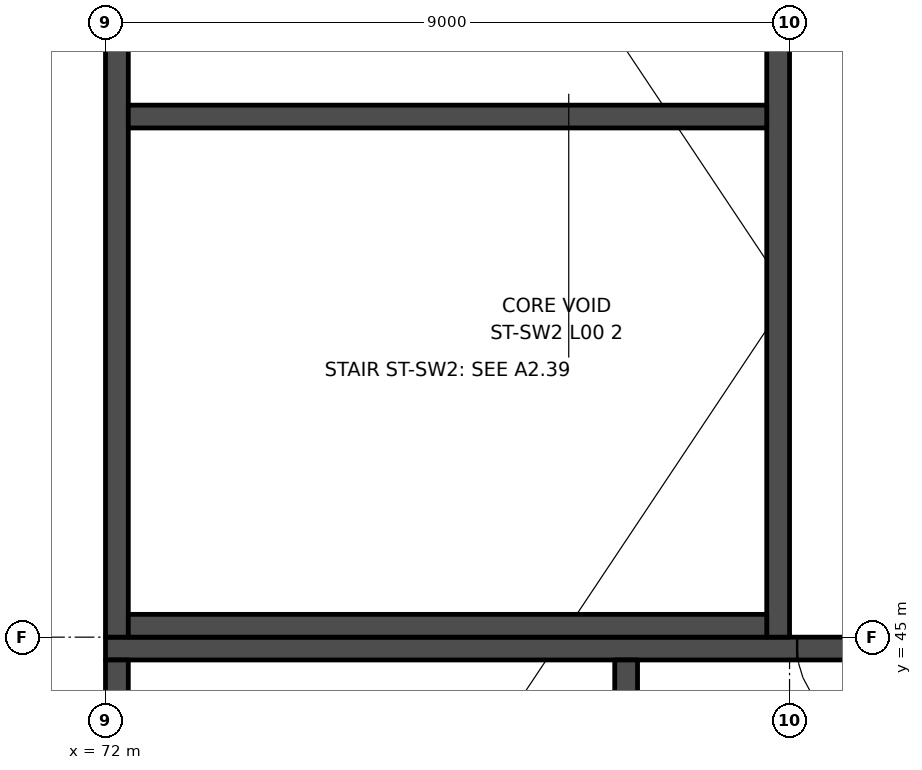
"""IFC4 building model, lengths in metres.
Left out: names, types, materials, properties, quantities, classifications, styles, units other than length and angle.
Written with IfcOpenShell. Run it as: python <this file> out.ifc"""

import sys

from ifc_helpers import new_model, si_unit, direction, frame, frame_2d, origin, place, context, subcontext, project, spatial, rectangle, extrude, element, fill, save


model = new_model("IFC4")
c1 = context("Model", 3, precision=1e-05, world=origin(), true_north=direction((0.0, 1.0)))
c2 = subcontext(c1, "Body", "Model", "MODEL_VIEW")
j1 = project(units=[si_unit("LENGTHUNIT", "METRE"), si_unit("PLANEANGLEUNIT", "RADIAN")], contexts=[c1])
p1 = place(None, origin())
s1 = spatial("IfcSite", under=j1, at=p1, CompositionType="ELEMENT")
p2 = place(p1, origin())
s2 = spatial("IfcBuilding", under=s1, at=p2, CompositionType="ELEMENT")
p3 = place(p2, origin())
s3 = spatial("IfcBuildingStorey", under=s2, at=p3, CompositionType="ELEMENT", Elevation=0.0)
p4 = place(p3, frame((90.25, 44.85, 0.0), z_axis=(0.0, 0.0, 1.0), x_axis=(-1.0, 0.0, 0.0)))
e1 = element("IfcWall", 1, at=p4, inside=s3, PredefinedType="SHEAR", context=c2, shape_type="SweptSolid", body=[
    extrude(rectangle(XDim=18.25, YDim=0.3, at=frame_2d((9.125, 0.0))), origin(), (0.0, 0.0, 1.0), 7.0),
])
p5 = place(p4, frame((8.15, 0.0, 0.0)))
e2 = element("IfcOpeningElement", 2, at=p5, cuts=e1, PredefinedType="OPENING", context=c2, shape_type="SweptSolid", body=[
    extrude(rectangle(XDim=1.0, YDim=2.1, at=frame_2d((0.5, 1.05))), frame((0.0, 0.16, 0.0), z_axis=(0.0, -1.0, 0.0), x_axis=(1.0, 0.0, 0.0)), (0.0, 0.0, 1.0), 0.32),
])
for number, where, z_axis, x_axis in (
    (3, (72.15, 44.7, 0.0), (0.0, 0.0, 1.0), (0.0, -1.0, 0.0)),
    (4, (78.85, 44.7, 0.0), (0.0, 0.0, 1.0), (0.0, -1.0, 0.0)),
):
    element("IfcWall", number, at=place(p3, frame(where, z_axis=z_axis, x_axis=x_axis)), inside=s3, PredefinedType="SHEAR", context=c2, shape_type="SweptSolid", body=[
        extrude(rectangle(XDim=8.4, YDim=0.3, at=frame_2d((4.2, 0.0))), origin(), (0.0, 0.0, 1.0), 7.0),
    ])
p6 = place(p3, frame((80.85, 63.0, 0.0), z_axis=(0.0, 0.0, 1.0), x_axis=(0.0, -1.0, 0.0)))
e5 = element("IfcWall", 5, at=p6, inside=s3, PredefinedType="SHEAR", context=c2, shape_type="SweptSolid", body=[
    extrude(rectangle(XDim=18.0, YDim=0.3, at=frame_2d((9.0, 0.0))), origin(), (0.0, 0.0, 1.0), 7.0),
])
p7 = place(p6, frame((8.6, 0.0, 0.0)))
e6 = element("IfcOpeningElement", 6, at=p7, cuts=e5, PredefinedType="OPENING", context=c2, shape_type="SweptSolid", body=[
    extrude(rectangle(XDim=1.2, YDim=2.1, at=frame_2d((0.6, 1.05))), frame((0.0, 0.16, 0.0), z_axis=(0.0, -1.0, 0.0), x_axis=(1.0, 0.0, 0.0)), (0.0, 0.0, 1.0), 0.32),
])
p8 = place(p3, frame((72.15, 63.0, 0.0), z_axis=(0.0, 0.0, 1.0), x_axis=(0.0, -1.0, 0.0)))
e7 = element("IfcWall", 7, at=p8, inside=s3, PredefinedType="SHEAR", context=c2, shape_type="SweptSolid", body=[
    extrude(rectangle(XDim=18.0, YDim=0.3, at=frame_2d((9.0, 0.0))), origin(), (0.0, 0.0, 1.0), 7.0),
])
for number, where, z_axis, x_axis in (
    (8, (80.7, 45.15, 0.0), (0.0, 0.0, 1.0), (-1.0, 0.0, 0.0)),
    (9, (80.7, 51.85, 0.0), (0.0, 0.0, 1.0), (-1.0, 0.0, 0.0)),
):
    element("IfcWall", number, at=place(p3, frame(where, z_axis=z_axis, x_axis=x_axis)), inside=s3, PredefinedType="SHEAR", context=c2, shape_type="SweptSolid", body=[
        extrude(rectangle(XDim=8.4, YDim=0.3, at=frame_2d((4.2, 0.0))), origin(), (0.0, 0.0, 1.0), 7.0),
    ])
p9 = place(p5, origin())
e10 = element("IfcDoor", 10, at=p9, inside=s3, OperationType="SINGLE_SWING_LEFT", PredefinedType="DOOR", context=c2, shape_type="SweptSolid", body=[
    extrude(rectangle(XDim=1.0, YDim=2.1, at=frame_2d((0.5, 1.05))), frame((0.0, 0.025, 0.0), z_axis=(0.0, -1.0, 0.0), x_axis=(1.0, 0.0, 0.0)), (0.0, 0.0, 1.0), 0.05),
])
fill(e2, e10)
save(model, sys.argv[1])
